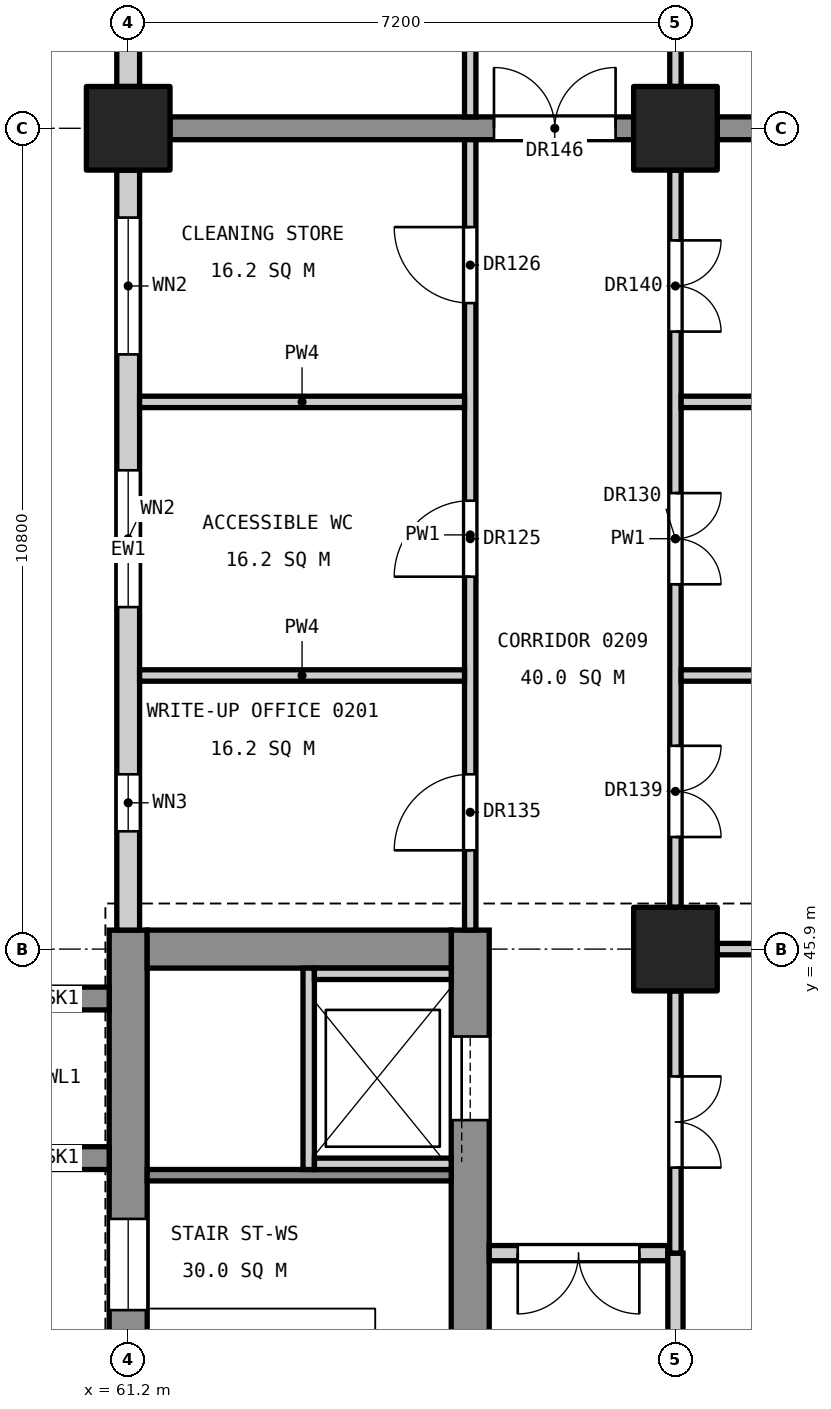
"""IFC4 building model, lengths in metres.
Left out: names, types, materials, properties, quantities, classifications, styles, units other than length and angle.
Written with IfcOpenShell. Run it as: python <this file> out.ifc"""

import sys

from ifc_helpers import new_model, si_unit, direction, frame, frame_2d, origin, origin_2d, place, context, subcontext, project, spatial, rectangle, extrude, element, fill, save


model = new_model("IFC4")
c1 = context("Model", 3, precision=1e-05, world=origin(), true_north=direction((0.0, 1.0)))
c2 = subcontext(c1, "Body", "Model", "MODEL_VIEW")
j1 = project(units=[si_unit("LENGTHUNIT", "METRE"), si_unit("PLANEANGLEUNIT", "RADIAN")], contexts=[c1])
p1 = place(None, origin())
s1 = spatial("IfcSite", under=j1, at=p1, CompositionType="ELEMENT")
p2 = place(p1, origin())
s2 = spatial("IfcBuilding", under=s1, at=p2, CompositionType="ELEMENT")
p3 = place(p2, frame((0.0, 0.0, 11.4)))
s3 = spatial("IfcBuildingStorey", under=s2, at=p3, CompositionType="ELEMENT", Elevation=11.4)
for number, where, z_axis, x_axis in (
    (1, (61.2, 56.7, 0.0), (0.0, 0.0, 1.0), (1.0, 0.0, 0.0)),
    (2, (68.4, 45.9, 0.0), (0.0, 0.0, 1.0), (1.0, 0.0, 0.0)),
    (3, (68.4, 56.7, 0.0), (0.0, 0.0, 1.0), (1.0, 0.0, 0.0)),
):
    element("IfcColumn", number, at=place(p3, frame(where, z_axis=z_axis, x_axis=x_axis)), inside=s3, PredefinedType="COLUMN", context=c2, shape_type="SweptSolid", body=[
        extrude(rectangle(XDim=1.1, YDim=1.1, at=origin_2d()), origin(), (0.0, 0.0, 1.0), 5.4),
    ])
p4 = place(p3, frame((61.2, 34.85, 0.0), z_axis=(0.0, 0.0, 1.0), x_axis=(0.0, 1.0, 0.0)))
e4 = element("IfcWall", 4, at=p4, inside=s3, PredefinedType="SHEAR", context=c2, shape_type="SweptSolid", body=[
    extrude(rectangle(XDim=11.3, YDim=0.5, at=frame_2d((5.65, 0.0))), origin(), (0.0, 0.0, 1.0), 5.1),
])
p5 = place(p4, frame((6.3, 0.0, 3.4)))
e5 = element("IfcOpeningElement", 5, at=p5, cuts=e4, PredefinedType="OPENING", context=c2, shape_type="SweptSolid", body=[
    extrude(rectangle(XDim=1.2, YDim=0.9, at=frame_2d((0.6, 0.45))), frame((0.0, 0.26, 0.0), z_axis=(0.0, -1.0, 0.0), x_axis=(1.0, 0.0, 0.0)), (0.0, 0.0, 1.0), 0.52),
])
p6 = place(p3, frame((65.7, 34.85, 0.0), z_axis=(0.0, 0.0, 1.0), x_axis=(0.0, 1.0, 0.0)))
e6 = element("IfcWall", 6, at=p6, inside=s3, PredefinedType="SHEAR", context=c2, shape_type="SweptSolid", body=[
    extrude(rectangle(XDim=11.3, YDim=0.5, at=frame_2d((5.65, 0.0))), origin(), (0.0, 0.0, 1.0), 5.1),
])
p7 = place(p6, frame((0.55, 0.0, 0.0)))
e7 = element("IfcOpeningElement", 7, at=p7, cuts=e6, PredefinedType="OPENING", context=c2, shape_type="SweptSolid", body=[
    extrude(rectangle(XDim=1.4, YDim=2.1, at=frame_2d((0.7, 1.05))), frame((0.0, 0.26, 0.0), z_axis=(0.0, -1.0, 0.0), x_axis=(1.0, 0.0, 0.0)), (0.0, 0.0, 1.0), 0.52),
])
p8 = place(p6, frame((8.8, 0.0, 0.0)))
e8 = element("IfcOpeningElement", 8, at=p8, cuts=e6, PredefinedType="OPENING", context=c2, shape_type="SweptSolid", body=[
    extrude(rectangle(XDim=1.1, YDim=2.1, at=frame_2d((0.55, 1.05))), frame((0.0, 0.26, 0.0), z_axis=(0.0, -1.0, 0.0), x_axis=(1.0, 0.0, 0.0)), (0.0, 0.0, 1.0), 0.52),
])
p9 = place(p3, frame((61.45, 45.9, 0.0), z_axis=(0.0, 0.0, 1.0), x_axis=(1.0, 0.0, 0.0)))
e9 = element("IfcWall", 9, at=p9, inside=s3, PredefinedType="SHEAR", context=c2, shape_type="SweptSolid", body=[
    extrude(rectangle(XDim=4.0, YDim=0.5, at=frame_2d((2.0, 0.0))), origin(), (0.0, 0.0, 1.0), 5.1),
])
for number, where, z_axis, x_axis in (
    (10, (60.95, 43.15, 0.0), (0.0, 0.0, 1.0), (-1.0, 0.0, 0.0)),
    (11, (60.95, 45.25, 0.0), (0.0, 0.0, 1.0), (-1.0, 0.0, 0.0)),
):
    element("IfcWall", number, at=place(p3, frame(where, z_axis=z_axis, x_axis=x_axis)), inside=s3, PredefinedType="SHEAR", context=c2, shape_type="SweptSolid", body=[
        extrude(rectangle(XDim=1.25, YDim=0.3, at=frame_2d((0.625, 0.0))), origin(), (0.0, 0.0, 1.0), 5.4),
    ])
p10 = place(p3, frame((61.75, 56.7, 0.0), z_axis=(0.0, 0.0, 1.0), x_axis=(1.0, 0.0, 0.0)))
e12 = element("IfcWall", 12, at=p10, inside=s3, PredefinedType="SHEAR", context=c2, shape_type="SweptSolid", body=[
    extrude(rectangle(XDim=6.1, YDim=0.3, at=frame_2d((3.05, 0.0))), origin(), (0.0, 0.0, 1.0), 5.1),
])
p11 = place(p10, frame((4.262, 0.0, 0.0)))
e13 = element("IfcOpeningElement", 13, at=p11, cuts=e12, PredefinedType="OPENING", context=c2, shape_type="SweptSolid", body=[
    extrude(rectangle(XDim=1.6, YDim=2.1, at=frame_2d((0.8, 1.05))), frame((0.0, 0.16, 0.0), z_axis=(0.0, -1.0, 0.0), x_axis=(1.0, 0.0, 0.0)), (0.0, 0.0, 1.0), 0.32),
])
p12 = place(p3, frame((68.95, 56.7, 0.0), z_axis=(0.0, 0.0, 1.0), x_axis=(1.0, 0.0, 0.0)))
e14 = element("IfcWall", 14, at=p12, inside=s3, PredefinedType="SHEAR", context=c2, shape_type="SweptSolid", body=[
    extrude(rectangle(XDim=9.7, YDim=0.3, at=frame_2d((4.85, 0.0))), origin(), (0.0, 0.0, 1.0), 5.1),
])
p13 = place(p3, frame((61.45, 42.925, 0.0), z_axis=(0.0, 0.0, 1.0), x_axis=(1.0, 0.0, 0.0)))
e15 = element("IfcWall", 15, at=p13, inside=s3, PredefinedType="SOLIDWALL", context=c2, shape_type="SweptSolid", body=[
    extrude(rectangle(XDim=4.0, YDim=0.15, at=frame_2d((2.0, 0.0))), origin(), (0.0, 0.0, 1.0), 5.1),
])
p14 = place(p3, frame((63.575, 43.0, 0.0), z_axis=(0.0, 0.0, 1.0), x_axis=(0.0, 1.0, 0.0)))
e16 = element("IfcWall", 16, at=p14, inside=s3, PredefinedType="SOLIDWALL", context=c2, shape_type="SweptSolid", body=[
    extrude(rectangle(XDim=2.65, YDim=0.15, at=frame_2d((1.325, 0.0))), origin(), (0.0, 0.0, 1.0), 5.4),
])
for number, where, z_axis, x_axis in (
    (17, (63.65, 43.075, 0.0), (0.0, 0.0, 1.0), (1.0, 0.0, 0.0)),
    (18, (63.65, 45.575, 0.0), (0.0, 0.0, 1.0), (1.0, 0.0, 0.0)),
):
    element("IfcWall", number, at=place(p3, frame(where, z_axis=z_axis, x_axis=x_axis)), inside=s3, PredefinedType="SOLIDWALL", context=c2, shape_type="SweptSolid", body=[
        extrude(rectangle(XDim=1.8, YDim=0.15, at=frame_2d((0.9, 0.0))), origin(), (0.0, 0.0, 1.0), 5.4),
    ])
p15 = place(p3, frame((61.2, 46.15, 0.0), z_axis=(0.0, 0.0, 1.0), x_axis=(0.0, 1.0, 0.0)))
e19 = element("IfcWall", 19, at=p15, inside=s3, PredefinedType="STANDARD", context=c2, shape_type="SweptSolid", body=[
    extrude(rectangle(XDim=10.0, YDim=0.3, at=frame_2d((5.0, 0.0))), origin(), (0.0, 0.0, 1.0), 4.1),
])
p16 = place(p15, frame((1.3, 0.0, 0.8)))
e20 = element("IfcOpeningElement", 20, at=p16, cuts=e19, PredefinedType="OPENING", context=c2, shape_type="SweptSolid", body=[
    extrude(rectangle(XDim=0.75, YDim=1.2, at=frame_2d((0.375, 0.6))), frame((0.0, 0.16, 0.0), z_axis=(0.0, -1.0, 0.0), x_axis=(1.0, 0.0, 0.0)), (0.0, 0.0, 1.0), 0.32),
])
p17 = place(p15, frame((4.25, 0.0, 0.9)))
e21 = element("IfcOpeningElement", 21, at=p17, cuts=e19, PredefinedType="OPENING", context=c2, shape_type="SweptSolid", body=[
    extrude(rectangle(XDim=1.8, YDim=3.0, at=frame_2d((0.9, 1.5))), frame((0.0, 0.16, 0.0), z_axis=(0.0, -1.0, 0.0), x_axis=(1.0, 0.0, 0.0)), (0.0, 0.0, 1.0), 0.32),
])
p18 = place(p15, frame((7.575, 0.0, 0.9)))
e22 = element("IfcOpeningElement", 22, at=p18, cuts=e19, PredefinedType="OPENING", context=c2, shape_type="SweptSolid", body=[
    extrude(rectangle(XDim=1.8, YDim=3.0, at=frame_2d((0.9, 1.5))), frame((0.0, 0.16, 0.0), z_axis=(0.0, -1.0, 0.0), x_axis=(1.0, 0.0, 0.0)), (0.0, 0.0, 1.0), 0.32),
])
p19 = place(p3, frame((61.2, 57.25, 0.0), z_axis=(0.0, 0.0, 1.0), x_axis=(0.0, 1.0, 0.0)))
e23 = element("IfcWall", 23, at=p19, inside=s3, PredefinedType="STANDARD", context=c2, shape_type="SweptSolid", body=[
    extrude(rectangle(XDim=2.8, YDim=0.3, at=frame_2d((1.4, 0.0))), origin(), (0.0, 0.0, 1.0), 4.1),
])
p20 = place(p19, frame((1.025, 0.0, 0.8)))
e24 = element("IfcOpeningElement", 24, at=p20, cuts=e23, PredefinedType="OPENING", context=c2, shape_type="SweptSolid", body=[
    extrude(rectangle(XDim=0.75, YDim=1.2, at=frame_2d((0.375, 0.6))), frame((0.0, 0.16, 0.0), z_axis=(0.0, -1.0, 0.0), x_axis=(1.0, 0.0, 0.0)), (0.0, 0.0, 1.0), 0.32),
])
p21 = place(p3, frame((65.7, 46.15, 0.0), z_axis=(0.0, 0.0, 1.0), x_axis=(0.0, 1.0, 0.0)))
e25 = element("IfcWall", 25, at=p21, inside=s3, PredefinedType="PARTITIONING", context=c2, shape_type="SweptSolid", body=[
    extrude(rectangle(XDim=10.4, YDim=0.15, at=frame_2d((5.2, 0.0))), origin(), (0.0, 0.0, 1.0), 4.0),
])
p22 = place(p21, frame((4.65, 0.0, 0.0)))
e26 = element("IfcOpeningElement", 26, at=p22, cuts=e25, PredefinedType="OPENING", context=c2, shape_type="SweptSolid", body=[
    extrude(rectangle(XDim=1.0, YDim=2.1, at=frame_2d((0.5, 1.05))), frame((0.0, 0.085, 0.0), z_axis=(0.0, -1.0, 0.0), x_axis=(1.0, 0.0, 0.0)), (0.0, 0.0, 1.0), 0.17),
])
p23 = place(p21, frame((8.25, 0.0, 0.0)))
e27 = element("IfcOpeningElement", 27, at=p23, cuts=e25, PredefinedType="OPENING", context=c2, shape_type="SweptSolid", body=[
    extrude(rectangle(XDim=1.0, YDim=2.1, at=frame_2d((0.5, 1.05))), frame((0.0, 0.085, 0.0), z_axis=(0.0, -1.0, 0.0), x_axis=(1.0, 0.0, 0.0)), (0.0, 0.0, 1.0), 0.17),
])
p24 = place(p21, frame((1.05, 0.0, 0.0)))
e28 = element("IfcOpeningElement", 28, at=p24, cuts=e25, PredefinedType="OPENING", context=c2, shape_type="SweptSolid", body=[
    extrude(rectangle(XDim=1.0, YDim=2.1, at=frame_2d((0.5, 1.05))), frame((0.0, 0.085, 0.0), z_axis=(0.0, -1.0, 0.0), x_axis=(1.0, 0.0, 0.0)), (0.0, 0.0, 1.0), 0.17),
])
p25 = place(p3, frame((65.7, 56.85, 0.0), z_axis=(0.0, 0.0, 1.0), x_axis=(0.0, 1.0, 0.0)))
e29 = element("IfcWall", 29, at=p25, inside=s3, PredefinedType="PARTITIONING", context=c2, shape_type="SweptSolid", body=[
    extrude(rectangle(XDim=3.2, YDim=0.15, at=frame_2d((1.6, 0.0))), origin(), (0.0, 0.0, 1.0), 4.0),
])
p26 = place(p25, frame((1.15, 0.0, 0.0)))
e30 = element("IfcOpeningElement", 30, at=p26, cuts=e29, PredefinedType="OPENING", context=c2, shape_type="SweptSolid", body=[
    extrude(rectangle(XDim=1.0, YDim=2.1, at=frame_2d((0.5, 1.05))), frame((0.0, 0.085, 0.0), z_axis=(0.0, -1.0, 0.0), x_axis=(1.0, 0.0, 0.0)), (0.0, 0.0, 1.0), 0.17),
])
for number, where, z_axis, x_axis in (
    (31, (61.35, 49.5, 0.0), (0.0, 0.0, 1.0), (1.0, 0.0, 0.0)),
    (32, (61.35, 53.1, 0.0), (0.0, 0.0, 1.0), (1.0, 0.0, 0.0)),
):
    element("IfcWall", number, at=place(p3, frame(where, z_axis=z_axis, x_axis=x_axis)), inside=s3, PredefinedType="PARTITIONING", context=c2, shape_type="SweptSolid", body=[
        extrude(rectangle(XDim=4.275, YDim=0.15, at=frame_2d((2.137, 0.0))), origin(), (0.0, 0.0, 1.0), 4.3),
    ])
p27 = place(p3, frame((65.95, 41.9, 0.0), z_axis=(0.0, 0.0, 1.0), x_axis=(1.0, 0.0, 0.0)))
e33 = element("IfcWall", 33, at=p27, inside=s3, PredefinedType="PARTITIONING", context=c2, shape_type="SweptSolid", body=[
    extrude(rectangle(XDim=2.35, YDim=0.2, at=frame_2d((1.175, 0.0))), origin(), (0.0, 0.0, 1.0), 4.0),
])
p28 = place(p27, frame((0.375, 0.0, 0.0)))
e34 = element("IfcOpeningElement", 34, at=p28, cuts=e33, PredefinedType="OPENING", context=c2, shape_type="SweptSolid", body=[
    extrude(rectangle(XDim=1.6, YDim=2.1, at=frame_2d((0.8, 1.05))), frame((0.0, 0.11, 0.0), z_axis=(0.0, -1.0, 0.0), x_axis=(1.0, 0.0, 0.0)), (0.0, 0.0, 1.0), 0.22),
])
p29 = place(p3, frame((68.4, 35.65, 0.0), z_axis=(0.0, 0.0, 1.0), x_axis=(0.0, 1.0, 0.0)))
e35 = element("IfcWall", 35, at=p29, inside=s3, PredefinedType="PARTITIONING", context=c2, shape_type="SweptSolid", body=[
    extrude(rectangle(XDim=6.25, YDim=0.2, at=frame_2d((3.125, 0.0))), origin(), (0.0, 0.0, 1.0), 4.0),
])
p30 = place(p3, frame((68.4, 41.9, 0.0), z_axis=(0.0, 0.0, 1.0), x_axis=(0.0, 1.0, 0.0)))
e36 = element("IfcWall", 36, at=p30, inside=s3, PredefinedType="PARTITIONING", context=c2, shape_type="SweptSolid", body=[
    extrude(rectangle(XDim=3.45, YDim=0.15, at=frame_2d((1.725, 0.0))), origin(), (0.0, 0.0, 1.0), 4.0),
])
p31 = place(p30, frame((1.125, 0.0, 0.0)))
e37 = element("IfcOpeningElement", 37, at=p31, cuts=e36, PredefinedType="OPENING", context=c2, shape_type="SweptSolid", body=[
    extrude(rectangle(XDim=1.2, YDim=2.1, at=frame_2d((0.6, 1.05))), frame((0.0, 0.085, 0.0), z_axis=(0.0, -1.0, 0.0), x_axis=(1.0, 0.0, 0.0)), (0.0, 0.0, 1.0), 0.17),
])
p32 = place(p3, frame((68.4, 46.45, 0.0), z_axis=(0.0, 0.0, 1.0), x_axis=(0.0, 1.0, 0.0)))
e38 = element("IfcWall", 38, at=p32, inside=s3, PredefinedType="PARTITIONING", context=c2, shape_type="SweptSolid", body=[
    extrude(rectangle(XDim=9.7, YDim=0.15, at=frame_2d((4.85, 0.0))), origin(), (0.0, 0.0, 1.0), 4.0),
])
p33 = place(p32, frame((4.25, 0.0, 0.0)))
e39 = element("IfcOpeningElement", 39, at=p33, cuts=e38, PredefinedType="OPENING", context=c2, shape_type="SweptSolid", body=[
    extrude(rectangle(XDim=1.2, YDim=2.1, at=frame_2d((0.6, 1.05))), frame((0.0, 0.085, 0.0), z_axis=(0.0, -1.0, 0.0), x_axis=(1.0, 0.0, 0.0)), (0.0, 0.0, 1.0), 0.17),
])
p34 = place(p32, frame((0.925, 0.0, 0.0)))
e40 = element("IfcOpeningElement", 40, at=p34, cuts=e38, PredefinedType="OPENING", context=c2, shape_type="SweptSolid", body=[
    extrude(rectangle(XDim=1.2, YDim=2.1, at=frame_2d((0.6, 1.05))), frame((0.0, 0.085, 0.0), z_axis=(0.0, -1.0, 0.0), x_axis=(1.0, 0.0, 0.0)), (0.0, 0.0, 1.0), 0.17),
])
p35 = place(p32, frame((7.575, 0.0, 0.0)))
e41 = element("IfcOpeningElement", 41, at=p35, cuts=e38, PredefinedType="OPENING", context=c2, shape_type="SweptSolid", body=[
    extrude(rectangle(XDim=1.2, YDim=2.1, at=frame_2d((0.6, 1.05))), frame((0.0, 0.085, 0.0), z_axis=(0.0, -1.0, 0.0), x_axis=(1.0, 0.0, 0.0)), (0.0, 0.0, 1.0), 0.17),
])
p36 = place(p3, frame((68.4, 57.25, 0.0), z_axis=(0.0, 0.0, 1.0), x_axis=(0.0, 1.0, 0.0)))
e42 = element("IfcWall", 42, at=p36, inside=s3, PredefinedType="PARTITIONING", context=c2, shape_type="SweptSolid", body=[
    extrude(rectangle(XDim=3.05, YDim=0.15, at=frame_2d((1.525, 0.0))), origin(), (0.0, 0.0, 1.0), 4.0),
])
p37 = place(p36, frame((0.925, 0.0, 0.0)))
e43 = element("IfcOpeningElement", 43, at=p37, cuts=e42, PredefinedType="OPENING", context=c2, shape_type="SweptSolid", body=[
    extrude(rectangle(XDim=1.2, YDim=2.1, at=frame_2d((0.6, 1.05))), frame((0.0, 0.085, 0.0), z_axis=(0.0, -1.0, 0.0), x_axis=(1.0, 0.0, 0.0)), (0.0, 0.0, 1.0), 0.17),
])
p38 = place(p3, frame((68.95, 45.9, 0.0), z_axis=(0.0, 0.0, 1.0), x_axis=(1.0, 0.0, 0.0)))
e44 = element("IfcWall", 44, at=p38, inside=s3, PredefinedType="PARTITIONING", context=c2, shape_type="SweptSolid", body=[
    extrude(rectangle(XDim=9.7, YDim=0.15, at=frame_2d((4.85, 0.0))), origin(), (0.0, 0.0, 1.0), 4.3),
])
for number, where, z_axis, x_axis in (
    (45, (68.475, 49.5, 0.0), (0.0, 0.0, 1.0), (1.0, 0.0, 0.0)),
    (46, (68.475, 53.1, 0.0), (0.0, 0.0, 1.0), (1.0, 0.0, 0.0)),
):
    element("IfcWall", number, at=place(p3, frame(where, z_axis=z_axis, x_axis=x_axis)), inside=s3, PredefinedType="PARTITIONING", context=c2, shape_type="SweptSolid", body=[
        extrude(rectangle(XDim=10.575, YDim=0.15, at=frame_2d((5.288, 0.0))), origin(), (0.0, 0.0, 1.0), 4.3),
    ])
p39 = place(p8, origin())
e47 = element("IfcDoor", 47, at=p39, inside=s3, OperationType="SLIDING_TO_LEFT", PredefinedType="DOOR", context=c2, shape_type="SweptSolid", body=[
    extrude(rectangle(XDim=1.1, YDim=2.1, at=frame_2d((0.55, 1.05))), frame((0.0, 0.025, 0.0), z_axis=(0.0, -1.0, 0.0), x_axis=(1.0, 0.0, 0.0)), (0.0, 0.0, 1.0), 0.05),
])
fill(e8, e47)
p40 = place(p16, origin())
e48 = element("IfcWindow", 48, at=p40, inside=s3, PartitioningType="SINGLE_PANEL", PredefinedType="WINDOW", context=c2, shape_type="SweptSolid", body=[
    extrude(rectangle(XDim=0.75, YDim=1.2, at=frame_2d((0.375, 0.6))), frame((0.0, 0.03, 0.0), z_axis=(0.0, -1.0, 0.0), x_axis=(1.0, 0.0, 0.0)), (0.0, 0.0, 1.0), 0.06),
])
fill(e20, e48)
p41 = place(p17, origin())
e49 = element("IfcWindow", 49, at=p41, inside=s3, PartitioningType="SINGLE_PANEL", PredefinedType="WINDOW", context=c2, shape_type="SweptSolid", body=[
    extrude(rectangle(XDim=1.8, YDim=3.0, at=frame_2d((0.9, 1.5))), frame((0.0, 0.03, 0.0), z_axis=(0.0, -1.0, 0.0), x_axis=(1.0, 0.0, 0.0)), (0.0, 0.0, 1.0), 0.06),
])
fill(e21, e49)
p42 = place(p18, origin())
e50 = element("IfcWindow", 50, at=p42, inside=s3, PartitioningType="SINGLE_PANEL", PredefinedType="WINDOW", context=c2, shape_type="SweptSolid", body=[
    extrude(rectangle(XDim=1.8, YDim=3.0, at=frame_2d((0.9, 1.5))), frame((0.0, 0.03, 0.0), z_axis=(0.0, -1.0, 0.0), x_axis=(1.0, 0.0, 0.0)), (0.0, 0.0, 1.0), 0.06),
])
fill(e22, e50)
p43 = place(p5, origin())
e51 = element("IfcWindow", 51, at=p43, inside=s3, PartitioningType="SINGLE_PANEL", PredefinedType="WINDOW", context=c2, shape_type="SweptSolid", body=[
    extrude(rectangle(XDim=1.2, YDim=0.9, at=frame_2d((0.6, 0.45))), frame((0.0, 0.03, 0.0), z_axis=(0.0, -1.0, 0.0), x_axis=(1.0, 0.0, 0.0)), (0.0, 0.0, 1.0), 0.06),
])
fill(e5, e51)
p44 = place(p22, origin())
e52 = element("IfcDoor", 52, at=p44, inside=s3, OperationType="SINGLE_SWING_LEFT", PredefinedType="DOOR", context=c2, shape_type="SweptSolid", body=[
    extrude(rectangle(XDim=1.0, YDim=2.1, at=frame_2d((0.5, 1.05))), frame((0.0, 0.025, 0.0), z_axis=(0.0, -1.0, 0.0), x_axis=(1.0, 0.0, 0.0)), (0.0, 0.0, 1.0), 0.05),
])
fill(e26, e52)
p45 = place(p23, origin())
e53 = element("IfcDoor", 53, at=p45, inside=s3, OperationType="SINGLE_SWING_RIGHT", PredefinedType="DOOR", context=c2, shape_type="SweptSolid", body=[
    extrude(rectangle(XDim=1.0, YDim=2.1, at=frame_2d((0.5, 1.05))), frame((0.0, 0.025, 0.0), z_axis=(0.0, -1.0, 0.0), x_axis=(1.0, 0.0, 0.0)), (0.0, 0.0, 1.0), 0.05),
])
fill(e27, e53)
p46 = place(p33, frame((1.2, 0.0, 0.0), z_axis=(0.0, 0.0, 1.0), x_axis=(-1.0, 0.0, 0.0)))
e54 = element("IfcDoor", 54, at=p46, inside=s3, OperationType="DOUBLE_DOOR_SINGLE_SWING", PredefinedType="DOOR", context=c2, shape_type="SweptSolid", body=[
    extrude(rectangle(XDim=1.2, YDim=2.1, at=frame_2d((0.6, 1.05))), frame((0.0, 0.025, 0.0), z_axis=(0.0, -1.0, 0.0), x_axis=(1.0, 0.0, 0.0)), (0.0, 0.0, 1.0), 0.05),
])
fill(e39, e54)
p47 = place(p31, frame((1.2, 0.0, 0.0), z_axis=(0.0, 0.0, 1.0), x_axis=(-1.0, 0.0, 0.0)))
e55 = element("IfcDoor", 55, at=p47, inside=s3, OperationType="DOUBLE_DOOR_SINGLE_SWING", PredefinedType="DOOR", context=c2, shape_type="SweptSolid", body=[
    extrude(rectangle(XDim=1.2, YDim=2.1, at=frame_2d((0.6, 1.05))), frame((0.0, 0.025, 0.0), z_axis=(0.0, -1.0, 0.0), x_axis=(1.0, 0.0, 0.0)), (0.0, 0.0, 1.0), 0.05),
])
fill(e37, e55)
p48 = place(p24, origin())
e56 = element("IfcDoor", 56, at=p48, inside=s3, OperationType="SINGLE_SWING_LEFT", PredefinedType="DOOR", context=c2, shape_type="SweptSolid", body=[
    extrude(rectangle(XDim=1.0, YDim=2.1, at=frame_2d((0.5, 1.05))), frame((0.0, 0.025, 0.0), z_axis=(0.0, -1.0, 0.0), x_axis=(1.0, 0.0, 0.0)), (0.0, 0.0, 1.0), 0.05),
])
fill(e28, e56)
p49 = place(p34, frame((1.2, 0.0, 0.0), z_axis=(0.0, 0.0, 1.0), x_axis=(-1.0, 0.0, 0.0)))
e57 = element("IfcDoor", 57, at=p49, inside=s3, OperationType="DOUBLE_DOOR_SINGLE_SWING", PredefinedType="DOOR", context=c2, shape_type="SweptSolid", body=[
    extrude(rectangle(XDim=1.2, YDim=2.1, at=frame_2d((0.6, 1.05))), frame((0.0, 0.025, 0.0), z_axis=(0.0, -1.0, 0.0), x_axis=(1.0, 0.0, 0.0)), (0.0, 0.0, 1.0), 0.05),
])
fill(e40, e57)
p50 = place(p35, frame((1.2, 0.0, 0.0), z_axis=(0.0, 0.0, 1.0), x_axis=(-1.0, 0.0, 0.0)))
e58 = element("IfcDoor", 58, at=p50, inside=s3, OperationType="DOUBLE_DOOR_SINGLE_SWING", PredefinedType="DOOR", context=c2, shape_type="SweptSolid", body=[
    extrude(rectangle(XDim=1.2, YDim=2.1, at=frame_2d((0.6, 1.05))), frame((0.0, 0.025, 0.0), z_axis=(0.0, -1.0, 0.0), x_axis=(1.0, 0.0, 0.0)), (0.0, 0.0, 1.0), 0.05),
])
fill(e41, e58)
p51 = place(p28, frame((1.6, 0.0, 0.0), z_axis=(0.0, 0.0, 1.0), x_axis=(-1.0, 0.0, 0.0)))
e59 = element("IfcDoor", 59, at=p51, inside=s3, OperationType="DOUBLE_DOOR_SINGLE_SWING", PredefinedType="DOOR", context=c2, shape_type="SweptSolid", body=[
    extrude(rectangle(XDim=1.6, YDim=2.1, at=frame_2d((0.8, 1.05))), frame((0.0, 0.025, 0.0), z_axis=(0.0, -1.0, 0.0), x_axis=(1.0, 0.0, 0.0)), (0.0, 0.0, 1.0), 0.05),
])
fill(e34, e59)
p52 = place(p11, origin())
e60 = element("IfcDoor", 60, at=p52, inside=s3, OperationType="DOUBLE_DOOR_SINGLE_SWING", PredefinedType="DOOR", context=c2, shape_type="SweptSolid", body=[
    extrude(rectangle(XDim=1.6, YDim=2.1, at=frame_2d((0.8, 1.05))), frame((0.0, 0.025, 0.0), z_axis=(0.0, -1.0, 0.0), x_axis=(1.0, 0.0, 0.0)), (0.0, 0.0, 1.0), 0.05),
])
fill(e13, e60)
save(model, sys.argv[1])
